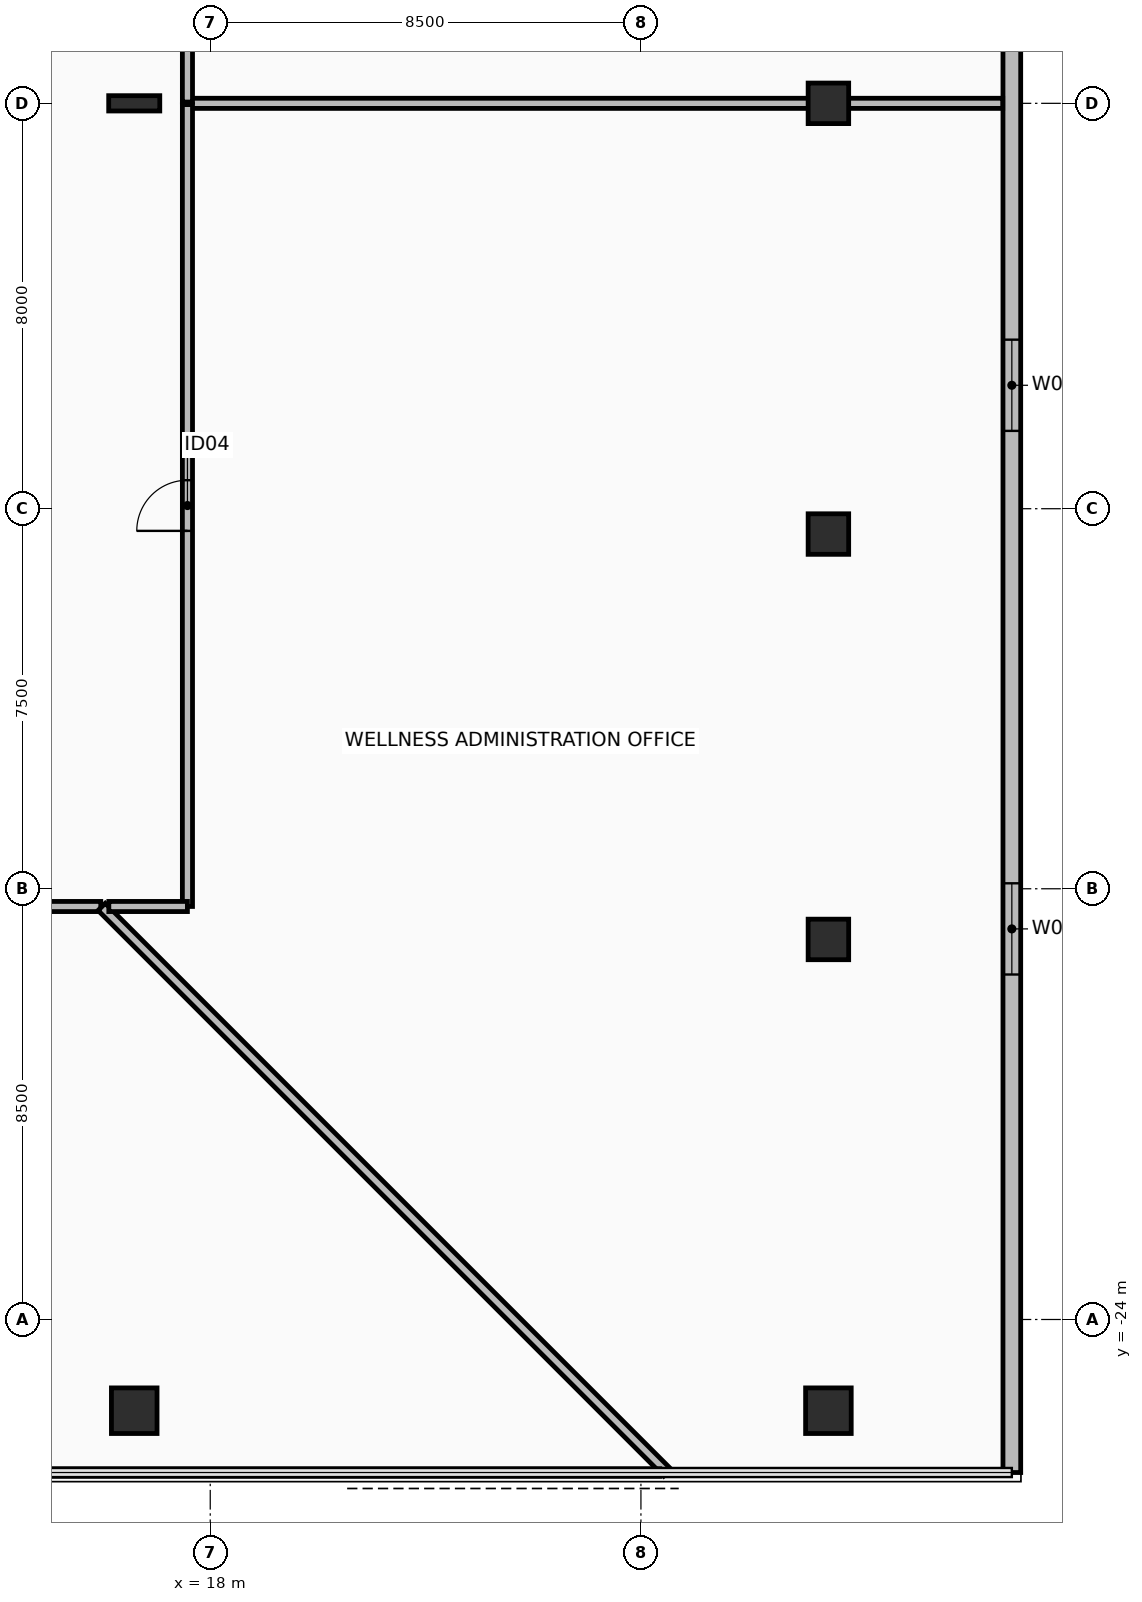
"""IFC4 building model, lengths in metres.
Left out: names, types, materials, properties, quantities, classifications, styles, units other than length and angle.
Written with IfcOpenShell. Run it as: python <this file> out.ifc"""

import sys

from ifc_helpers import new_model, si_unit, direction, frame, frame_2d, origin, origin_2d, place, context, subcontext, project, spatial, rectangle, hollow_rectangle, i_section, extrude, element, fill, save


model = new_model("IFC4")
c1 = context("Model", 3, precision=1e-05, world=origin(), true_north=direction((0.0, 1.0)))
c2 = subcontext(c1, "Body", "Model", "MODEL_VIEW")
j1 = project(units=[si_unit("LENGTHUNIT", "METRE"), si_unit("PLANEANGLEUNIT", "RADIAN")], contexts=[c1])
p1 = place(None, origin())
s1 = spatial("IfcSite", under=j1, at=p1, CompositionType="ELEMENT")
p2 = place(p1, origin())
s2 = spatial("IfcBuilding", under=s1, at=p2, CompositionType="ELEMENT")
p3 = place(p2, frame((0.0, 0.0, 21.5)))
s3 = spatial("IfcBuildingStorey", under=s2, at=p3, CompositionType="ELEMENT", Elevation=21.5)
for number, where, z_axis, x_axis in (
    (1, (16.5, -25.8, 0.0), (0.0, 0.0, 1.0), (1.0, 0.0, 0.0)),
    (2, (30.2, -25.8, 0.0), (0.0, 0.0, 1.0), (1.0, 0.0, 0.0)),
):
    element("IfcColumn", number, at=place(p3, frame(where, z_axis=z_axis, x_axis=x_axis)), inside=s3, PredefinedType="COLUMN", context=c2, shape_type="SweptSolid", body=[
        extrude(hollow_rectangle(XDim=0.9, YDim=0.9, WallThickness=0.05, at=origin_2d()), origin(), (0.0, 0.0, 1.0), 5.0),
    ])
for number, where, z_axis, x_axis in (
    (3, (30.2, -16.5, 0.0), (0.0, 0.0, 1.0), (1.0, 0.0, 0.0)),
    (4, (30.2, -8.5, 0.0), (0.0, 0.0, 1.0), (1.0, 0.0, 0.0)),
    (5, (30.2, 0.0, 0.0), (0.0, 0.0, 1.0), (1.0, 0.0, 0.0)),
):
    element("IfcColumn", number, at=place(p3, frame(where, z_axis=z_axis, x_axis=x_axis)), inside=s3, PredefinedType="COLUMN", context=c2, shape_type="SweptSolid", body=[
        extrude(hollow_rectangle(XDim=0.8, YDim=0.8, WallThickness=0.045, at=origin_2d()), origin(), (0.0, 0.0, 1.0), 5.0),
    ])
p4 = place(p3, frame((16.5, 0.0, 0.0), z_axis=(0.0, 0.0, 1.0), x_axis=(1.0, 0.0, 0.0)))
e6 = element("IfcColumn", 6, at=p4, inside=s3, PredefinedType="COLUMN", context=c2, shape_type="SweptSolid", body=[
    extrude(i_section(OverallWidth=0.302, OverallDepth=1.008, WebThickness=0.021, FlangeThickness=0.04, at=origin_2d()), origin(), (0.0, 0.0, 1.0), 5.0),
])
p5 = place(p3, frame((33.82, -27.02, 0.0), z_axis=(0.0, 0.0, 1.0), x_axis=(0.0, 1.0, 0.0)))
e7 = element("IfcWall", 7, at=p5, inside=s3, PredefinedType="STANDARD", context=c2, shape_type="SweptSolid", body=[
    extrude(rectangle(XDim=53.64, YDim=0.35, at=frame_2d((26.82, 0.0))), origin(), (0.0, 0.0, 1.0), 4.74),
])
p6 = place(p5, frame((9.828, 0.0, 0.95)))
e8 = element("IfcOpeningElement", 8, at=p6, cuts=e7, PredefinedType="OPENING", context=c2, shape_type="SweptSolid", body=[
    extrude(rectangle(XDim=1.8, YDim=2.2, at=frame_2d((0.9, 1.1))), frame((0.0, 0.185, 0.0), z_axis=(0.0, -1.0, 0.0), x_axis=(1.0, 0.0, 0.0)), (0.0, 0.0, 1.0), 0.37),
])
p7 = place(p5, frame((20.556, 0.0, 0.95)))
e9 = element("IfcOpeningElement", 9, at=p7, cuts=e7, PredefinedType="OPENING", context=c2, shape_type="SweptSolid", body=[
    extrude(rectangle(XDim=1.8, YDim=2.2, at=frame_2d((0.9, 1.1))), frame((0.0, 0.185, 0.0), z_axis=(0.0, -1.0, 0.0), x_axis=(1.0, 0.0, 0.0)), (0.0, 0.0, 1.0), 0.37),
])
p8 = place(p5, frame((31.284, 0.0, 0.95)))
e10 = element("IfcOpeningElement", 10, at=p8, cuts=e7, PredefinedType="OPENING", context=c2, shape_type="SweptSolid", body=[
    extrude(rectangle(XDim=1.8, YDim=2.2, at=frame_2d((0.9, 1.1))), frame((0.0, 0.185, 0.0), z_axis=(0.0, -1.0, 0.0), x_axis=(1.0, 0.0, 0.0)), (0.0, 0.0, 1.0), 0.37),
])
p9 = place(p5, frame((42.012, 0.0, 0.95)))
e11 = element("IfcOpeningElement", 11, at=p9, cuts=e7, PredefinedType="OPENING", context=c2, shape_type="SweptSolid", body=[
    extrude(rectangle(XDim=1.8, YDim=2.2, at=frame_2d((0.9, 1.1))), frame((0.0, 0.185, 0.0), z_axis=(0.0, -1.0, 0.0), x_axis=(1.0, 0.0, 0.0)), (0.0, 0.0, 1.0), 0.37),
])
p10 = place(p3, frame((-7.375, -15.85, 0.0), z_axis=(0.0, 0.0, 1.0), x_axis=(1.0, 0.0, 0.0)))
e12 = element("IfcWall", 12, at=p10, inside=s3, PredefinedType="PARTITIONING", context=c2, shape_type="SweptSolid", body=[
    extrude(rectangle(XDim=23.215, YDim=0.2, at=frame_2d((11.607, 0.0))), origin(), (0.0, 0.0, 1.0), 3.135),
])
p11 = place(p10, frame((11.182, 0.0, 0.0)))
e13 = element("IfcOpeningElement", 13, at=p11, cuts=e12, PredefinedType="OPENING", context=c2, shape_type="SweptSolid", body=[
    extrude(rectangle(XDim=0.85, YDim=2.1, at=frame_2d((0.425, 1.05))), frame((0.0, 0.11, 0.0), z_axis=(0.0, -1.0, 0.0), x_axis=(1.0, 0.0, 0.0)), (0.0, 0.0, 1.0), 0.22),
])
p12 = place(p3, frame((15.857, -15.857, 0.0), z_axis=(0.0, 0.0, 1.0), x_axis=(0.707106781187, -0.707106781187, 0.0)))
e14 = element("IfcWall", 14, at=p12, inside=s3, PredefinedType="PARTITIONING", context=c2, shape_type="SweptSolid", body=[
    extrude(rectangle(XDim=15.786, YDim=0.2, at=frame_2d((7.893, 0.0))), origin(), (0.0, 0.0, 1.0), 2.935),
])
p13 = place(p3, frame((26.872, -27.02, 0.0), z_axis=(0.0, 0.0, 1.0), x_axis=(-1.0, 0.0, 0.0)))
e15 = element("IfcWall", 15, at=p13, inside=s3, PredefinedType="PARTITIONING", context=c2, shape_type="SweptSolid", body=[
    extrude(rectangle(XDim=39.355, YDim=0.15, at=frame_2d((19.678, 0.0))), origin(), (0.0, 0.0, 1.0), 4.74),
])
p14 = place(p3, frame((33.64, 0.0, 0.0), z_axis=(0.0, 0.0, 1.0), x_axis=(-1.0, 0.0, 0.0)))
e16 = element("IfcWall", 16, at=p14, inside=s3, PredefinedType="PARTITIONING", context=c2, shape_type="SweptSolid", body=[
    extrude(rectangle(XDim=16.065, YDim=0.2, at=frame_2d((8.032, 0.0))), origin(), (0.0, 0.0, 1.0), 3.135),
])
p15 = place(p3, frame((17.55, 0.025, 0.0), z_axis=(0.0, 0.0, 1.0), x_axis=(0.0, 1.0, 0.0)))
e17 = element("IfcWall", 17, at=p15, inside=s3, PredefinedType="PARTITIONING", context=c2, shape_type="SweptSolid", body=[
    extrude(rectangle(XDim=8.75, YDim=0.2, at=frame_2d((4.375, 0.0))), origin(), (0.0, 0.0, 1.0), 3.135),
])
p16 = place(p3, frame((17.55, -15.849, 0.0), z_axis=(0.0, 0.0, 1.0), x_axis=(0.0, 1.0, 0.0)))
e18 = element("IfcWall", 18, at=p16, inside=s3, PredefinedType="PARTITIONING", context=c2, shape_type="SweptSolid", body=[
    extrude(rectangle(XDim=15.824, YDim=0.2, at=frame_2d((7.912, 0.0))), origin(), (0.0, 0.0, 1.0), 3.135),
])
p17 = place(p16, frame((7.412, 0.0, 0.0)))
e19 = element("IfcOpeningElement", 19, at=p17, cuts=e18, PredefinedType="OPENING", context=c2, shape_type="SweptSolid", body=[
    extrude(rectangle(XDim=1.0, YDim=2.15, at=frame_2d((0.5, 1.075))), frame((0.0, 0.11, 0.0), z_axis=(0.0, -1.0, 0.0), x_axis=(1.0, 0.0, 0.0)), (0.0, 0.0, 1.0), 0.22),
])
p18 = place(p3, frame((15.999, -15.85, 0.0), z_axis=(0.0, 0.0, 1.0), x_axis=(1.0, 0.0, 0.0)))
e20 = element("IfcWall", 20, at=p18, inside=s3, PredefinedType="PARTITIONING", context=c2, shape_type="SweptSolid", body=[
    extrude(rectangle(XDim=1.551, YDim=0.2, at=frame_2d((0.775, 0.0))), origin(), (0.0, 0.0, 1.0), 2.935),
])
p19 = place(p6, origin())
e21 = element("IfcWindow", 21, at=p19, inside=s3, PartitioningType="SINGLE_PANEL", PredefinedType="WINDOW", context=c2, shape_type="SweptSolid", body=[
    extrude(rectangle(XDim=1.8, YDim=2.2, at=frame_2d((0.9, 1.1))), frame((0.0, 0.03, 0.0), z_axis=(0.0, -1.0, 0.0), x_axis=(1.0, 0.0, 0.0)), (0.0, 0.0, 1.0), 0.06),
])
fill(e8, e21)
p20 = place(p7, origin())
e22 = element("IfcWindow", 22, at=p20, inside=s3, PartitioningType="SINGLE_PANEL", PredefinedType="WINDOW", context=c2, shape_type="SweptSolid", body=[
    extrude(rectangle(XDim=1.8, YDim=2.2, at=frame_2d((0.9, 1.1))), frame((0.0, 0.03, 0.0), z_axis=(0.0, -1.0, 0.0), x_axis=(1.0, 0.0, 0.0)), (0.0, 0.0, 1.0), 0.06),
])
fill(e9, e22)
p21 = place(p17, origin())
e23 = element("IfcDoor", 23, at=p21, inside=s3, OperationType="SINGLE_SWING_RIGHT", PredefinedType="DOOR", context=c2, shape_type="SweptSolid", body=[
    extrude(rectangle(XDim=1.0, YDim=2.15, at=frame_2d((0.5, 1.075))), frame((0.0, 0.025, 0.0), z_axis=(0.0, -1.0, 0.0), x_axis=(1.0, 0.0, 0.0)), (0.0, 0.0, 1.0), 0.05),
])
fill(e19, e23)
save(model, sys.argv[1])
